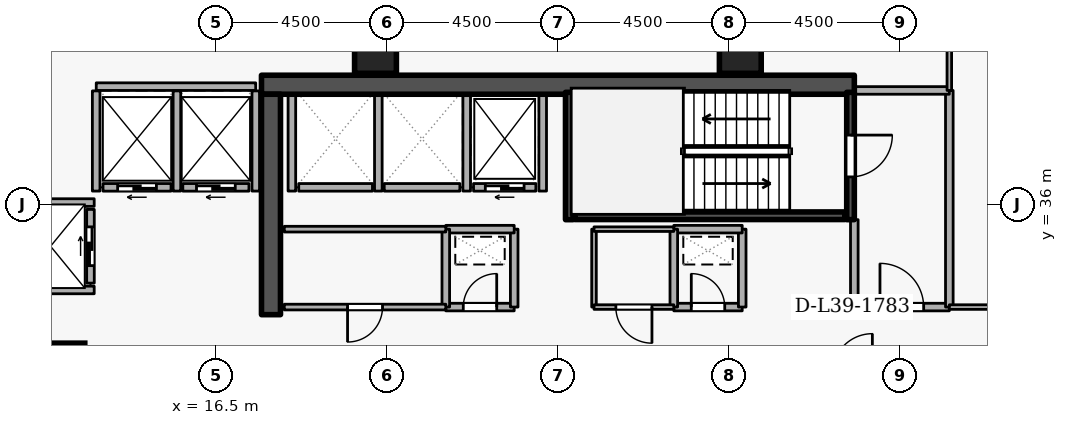
"""IFC4 building model, lengths in metres.
Left out: names, types, materials, properties, quantities, classifications, styles, units other than length and angle.
Written with IfcOpenShell. Run it as: python <this file> out.ifc"""

import sys

from ifc_helpers import new_model, si_unit, direction, frame, frame_2d, origin, origin_2d, place, context, subcontext, project, spatial, rectangle, extrude, element, fill, save


model = new_model("IFC4")
c1 = context("Model", 3, precision=1e-05, world=origin(), true_north=direction((0.0, 1.0)))
c2 = subcontext(c1, "Body", "Model", "MODEL_VIEW")
j1 = project(units=[si_unit("LENGTHUNIT", "METRE"), si_unit("PLANEANGLEUNIT", "RADIAN")], contexts=[c1])
p1 = place(None, origin())
s1 = spatial("IfcSite", under=j1, at=p1, CompositionType="ELEMENT")
p2 = place(p1, origin())
s2 = spatial("IfcBuilding", under=s1, at=p2, CompositionType="ELEMENT")
p3 = place(p2, frame((0.0, 0.0, 149.1)))
s3 = spatial("IfcBuildingStorey", under=s2, at=p3, CompositionType="ELEMENT", Elevation=149.1)
p4 = place(p3, frame((17.7, 39.15, 0.0), z_axis=(0.0, 0.0, 1.0), x_axis=(1.0, 0.0, 0.0)))
e1 = element("IfcWall", 1, at=p4, inside=s3, PredefinedType="SHEAR", context=c2, shape_type="SweptSolid", body=[
    extrude(rectangle(XDim=15.6, YDim=0.5, at=frame_2d((7.8, 0.0))), origin(), (0.0, 0.0, 1.0), 3.6),
])
p5 = place(p3, frame((17.95, 33.1, 0.0), z_axis=(0.0, 0.0, 1.0), x_axis=(0.0, 1.0, 0.0)))
e2 = element("IfcWall", 2, at=p5, inside=s3, PredefinedType="SHEAR", context=c2, shape_type="SweptSolid", body=[
    extrude(rectangle(XDim=5.8, YDim=0.5, at=frame_2d((2.9, 0.0))), origin(), (0.0, 0.0, 1.0), 3.6),
])
for number, where, z_axis, x_axis in (
    (3, (12.5, 31.8, 0.0), (0.0, 0.0, 1.0), (1.0, 0.0, 0.0)),
    (4, (20.7, 40.0, 0.0), (0.0, 0.0, 1.0), (1.0, 0.0, 0.0)),
    (5, (30.3, 40.0, 0.0), (0.0, 0.0, 1.0), (1.0, 0.0, 0.0)),
):
    element("IfcColumn", number, at=place(p3, frame(where, z_axis=z_axis, x_axis=x_axis)), inside=s3, PredefinedType="COLUMN", context=c2, shape_type="SweptSolid", body=[
        extrude(rectangle(XDim=1.1, YDim=1.1, at=origin_2d()), origin(), (0.0, 0.0, 1.0), 3.6),
    ])
p6 = place(p3, frame((24.92, 36.45, 0.0), z_axis=(0.0, 0.0, 1.0), x_axis=(-1.0, 0.0, 0.0)))
e6 = element("IfcWall", 6, at=p6, inside=s3, PredefinedType="STANDARD", context=c2, shape_type="SweptSolid", body=[
    extrude(rectangle(XDim=1.64, YDim=0.2, at=frame_2d((0.82, 0.0))), origin(), (0.0, 0.0, 1.0), 3.3),
])
p7 = place(p6, frame((0.31, 0.0, 0.0)))
e7 = element("IfcOpeningElement", 7, at=p7, cuts=e6, PredefinedType="OPENING", context=c2, shape_type="SweptSolid", body=[
    extrude(rectangle(XDim=1.02, YDim=2.06, at=frame_2d((0.51, 1.03))), frame((0.0, 0.11, 0.0), z_axis=(0.0, -1.0, 0.0), x_axis=(1.0, 0.0, 0.0)), (0.0, 0.0, 1.0), 0.22),
])
p8 = place(p3, frame((22.92, 36.45, 0.0), z_axis=(0.0, 0.0, 1.0), x_axis=(-1.0, 0.0, 0.0)))
e8 = element("IfcWall", 8, at=p8, inside=s3, PredefinedType="STANDARD", context=c2, shape_type="SweptSolid", body=[
    extrude(rectangle(XDim=1.99, YDim=0.2, at=frame_2d((0.995, 0.0))), origin(), (0.0, 0.0, 1.0), 3.3),
])
p9 = place(p3, frame((20.62, 36.45, 0.0), z_axis=(0.0, 0.0, 1.0), x_axis=(-1.0, 0.0, 0.0)))
e9 = element("IfcWall", 9, at=p9, inside=s3, PredefinedType="STANDARD", context=c2, shape_type="SweptSolid", body=[
    extrude(rectangle(XDim=1.94, YDim=0.2, at=frame_2d((0.97, 0.0))), origin(), (0.0, 0.0, 1.0), 3.3),
])
p10 = place(p3, frame((17.37, 36.45, 0.0), z_axis=(0.0, 0.0, 1.0), x_axis=(-1.0, 0.0, 0.0)))
e10 = element("IfcWall", 10, at=p10, inside=s3, PredefinedType="STANDARD", context=c2, shape_type="SweptSolid", body=[
    extrude(rectangle(XDim=1.74, YDim=0.2, at=frame_2d((0.87, 0.0))), origin(), (0.0, 0.0, 1.0), 3.3),
])
p11 = place(p10, frame((0.36, 0.0, 0.0)))
e11 = element("IfcOpeningElement", 11, at=p11, cuts=e10, PredefinedType="OPENING", context=c2, shape_type="SweptSolid", body=[
    extrude(rectangle(XDim=1.02, YDim=2.06, at=frame_2d((0.51, 1.03))), frame((0.0, 0.11, 0.0), z_axis=(0.0, -1.0, 0.0), x_axis=(1.0, 0.0, 0.0)), (0.0, 0.0, 1.0), 0.22),
])
p12 = place(p3, frame((15.32, 36.45, 0.0), z_axis=(0.0, 0.0, 1.0), x_axis=(-1.0, 0.0, 0.0)))
e12 = element("IfcWall", 12, at=p12, inside=s3, PredefinedType="STANDARD", context=c2, shape_type="SweptSolid", body=[
    extrude(rectangle(XDim=1.79, YDim=0.2, at=frame_2d((0.895, 0.0))), origin(), (0.0, 0.0, 1.0), 3.3),
])
p13 = place(p12, frame((0.385, 0.0, 0.0)))
e13 = element("IfcOpeningElement", 13, at=p13, cuts=e12, PredefinedType="OPENING", context=c2, shape_type="SweptSolid", body=[
    extrude(rectangle(XDim=1.02, YDim=2.06, at=frame_2d((0.51, 1.03))), frame((0.0, 0.11, 0.0), z_axis=(0.0, -1.0, 0.0), x_axis=(1.0, 0.0, 0.0)), (0.0, 0.0, 1.0), 0.22),
])
p14 = place(p3, frame((13.2, 33.93, 0.0), z_axis=(0.0, 0.0, 1.0), x_axis=(0.0, 1.0, 0.0)))
e14 = element("IfcWall", 14, at=p14, inside=s3, PredefinedType="STANDARD", context=c2, shape_type="SweptSolid", body=[
    extrude(rectangle(XDim=1.94, YDim=0.2, at=frame_2d((0.97, 0.0))), origin(), (0.0, 0.0, 1.0), 3.3),
])
p15 = place(p14, frame((0.46, 0.0, 0.0)))
e15 = element("IfcOpeningElement", 15, at=p15, cuts=e14, PredefinedType="OPENING", context=c2, shape_type="SweptSolid", body=[
    extrude(rectangle(XDim=1.02, YDim=2.06, at=frame_2d((0.51, 1.03))), frame((0.0, 0.11, 0.0), z_axis=(0.0, -1.0, 0.0), x_axis=(1.0, 0.0, 0.0)), (0.0, 0.0, 1.0), 0.22),
])
for number, where, z_axis, x_axis in (
    (16, (25.1, 36.352, 0.0), (0.0, 0.0, 1.0), (0.0, 1.0, 0.0)),
    (17, (23.1, 36.352, 0.0), (0.0, 0.0, 1.0), (0.0, 1.0, 0.0)),
    (18, (20.775, 36.352, 0.0), (0.0, 0.0, 1.0), (0.0, 1.0, 0.0)),
    (19, (18.5, 36.352, 0.0), (0.0, 0.0, 1.0), (0.0, 1.0, 0.0)),
):
    element("IfcWall", number, at=place(p3, frame(where, z_axis=z_axis, x_axis=x_axis)), inside=s3, PredefinedType="STANDARD", context=c2, shape_type="SweptSolid", body=[
        extrude(rectangle(XDim=2.536, YDim=0.2, at=frame_2d((1.268, 0.0))), origin(), (0.0, 0.0, 1.0), 3.3),
    ])
p16 = place(p3, frame((13.352, 39.1, 0.0), z_axis=(0.0, 0.0, 1.0), x_axis=(1.0, 0.0, 0.0)))
e20 = element("IfcWall", 20, at=p16, inside=s3, PredefinedType="STANDARD", context=c2, shape_type="SweptSolid", body=[
    extrude(rectangle(XDim=4.196, YDim=0.2, at=frame_2d((2.098, 0.0))), origin(), (0.0, 0.0, 1.0), 3.3),
])
p17 = place(p3, frame((17.55, 36.352, 0.0), z_axis=(0.0, 0.0, 1.0), x_axis=(0.0, 1.0, 0.0)))
e21 = element("IfcWall", 21, at=p17, inside=s3, PredefinedType="STANDARD", context=c2, shape_type="SweptSolid", body=[
    extrude(rectangle(XDim=2.636, YDim=0.2, at=frame_2d((1.318, 0.0))), origin(), (0.0, 0.0, 1.0), 2.505),
])
for number, where, z_axis, x_axis in (
    (22, (15.475, 36.352, 0.0), (0.0, 0.0, 1.0), (0.0, 1.0, 0.0)),
    (23, (13.35, 36.352, 0.0), (0.0, 0.0, 1.0), (0.0, 1.0, 0.0)),
):
    element("IfcWall", number, at=place(p3, frame(where, z_axis=z_axis, x_axis=x_axis)), inside=s3, PredefinedType="STANDARD", context=c2, shape_type="SweptSolid", body=[
        extrude(rectangle(XDim=2.636, YDim=0.2, at=frame_2d((1.318, 0.0))), origin(), (0.0, 0.0, 1.0), 3.3),
    ])
for number, where, z_axis, x_axis in (
    (24, (11.002, 36.05, 0.0), (0.0, 0.0, 1.0), (1.0, 0.0, 0.0)),
    (25, (11.002, 33.75, 0.0), (0.0, 0.0, 1.0), (1.0, 0.0, 0.0)),
):
    element("IfcWall", number, at=place(p3, frame(where, z_axis=z_axis, x_axis=x_axis)), inside=s3, PredefinedType="STANDARD", context=c2, shape_type="SweptSolid", body=[
        extrude(rectangle(XDim=2.296, YDim=0.2, at=frame_2d((1.148, 0.0))), origin(), (0.0, 0.0, 1.0), 3.3),
    ])
p18 = place(p3, frame((33.2, 38.95, 0.0), z_axis=(0.0, 0.0, 1.0), x_axis=(0.0, -1.0, 0.0)))
e26 = element("IfcWall", 26, at=p18, inside=s3, PredefinedType="SHEAR", context=c2, shape_type="SweptSolid", body=[
    extrude(rectangle(XDim=3.35, YDim=0.2, at=frame_2d((1.675, 0.0))), origin(), (0.0, 0.0, 1.0), 3.6),
])
p19 = place(p18, frame((1.125, 0.0, 0.0)))
e27 = element("IfcOpeningElement", 27, at=p19, cuts=e26, PredefinedType="OPENING", context=c2, shape_type="SweptSolid", body=[
    extrude(rectangle(XDim=1.1, YDim=2.1, at=frame_2d((0.55, 1.05))), frame((0.0, 0.11, 0.0), z_axis=(0.0, -1.0, 0.0), x_axis=(1.0, 0.0, 0.0)), (0.0, 0.0, 1.0), 0.22),
])
p20 = place(p3, frame((25.8, 35.6, 0.0), z_axis=(0.0, 0.0, 1.0), x_axis=(0.0, 1.0, 0.0)))
e28 = element("IfcWall", 28, at=p20, inside=s3, PredefinedType="SHEAR", context=c2, shape_type="SweptSolid", body=[
    extrude(rectangle(XDim=3.35, YDim=0.2, at=frame_2d((1.675, 0.0))), origin(), (0.0, 0.0, 1.0), 3.6),
])
p21 = place(p3, frame((25.95, 35.703, 0.0), z_axis=(0.0, 0.0, 1.0), x_axis=(1.0, 0.0, 0.0)))
e29 = element("IfcWall", 29, at=p21, inside=s3, PredefinedType="SHEAR", context=c2, shape_type="SweptSolid", body=[
    extrude(rectangle(XDim=7.1, YDim=0.2, at=frame_2d((3.55, 0.0))), origin(), (0.0, 0.0, 1.0), 3.6),
])
p22 = place(p3, frame((33.3, 33.3, 0.0), z_axis=(0.0, 0.0, 1.0), x_axis=(1.0, 0.0, 0.0)))
e30 = element("IfcWall", 30, at=p22, inside=s3, PredefinedType="STANDARD", context=c2, shape_type="SweptSolid", body=[
    extrude(rectangle(XDim=2.5, YDim=0.2, at=frame_2d((1.25, 0.0))), origin(), (0.0, 0.0, 1.0), 3.3),
])
p23 = place(p22, frame((0.675, 0.0, 0.0)))
e31 = element("IfcOpeningElement", 31, at=p23, cuts=e30, PredefinedType="OPENING", context=c2, shape_type="SweptSolid", body=[
    extrude(rectangle(XDim=1.15, YDim=2.1, at=frame_2d((0.575, 1.05))), frame((0.0, 0.11, 0.0), z_axis=(0.0, -1.0, 0.0), x_axis=(1.0, 0.0, 0.0)), (0.0, 0.0, 1.0), 0.22),
])
p24 = place(p3, frame((35.8, 33.3, 0.0), z_axis=(0.0, 0.0, 1.0), x_axis=(0.0, 1.0, 0.0)))
e32 = element("IfcWall", 32, at=p24, inside=s3, PredefinedType="STANDARD", context=c2, shape_type="SweptSolid", body=[
    extrude(rectangle(XDim=5.7, YDim=0.2, at=frame_2d((2.85, 0.0))), origin(), (0.0, 0.0, 1.0), 3.3),
])
p25 = place(p3, frame((35.8, 39.0, 0.0), z_axis=(0.0, 0.0, 1.0), x_axis=(-1.0, 0.0, 0.0)))
e33 = element("IfcWall", 33, at=p25, inside=s3, PredefinedType="STANDARD", context=c2, shape_type="SweptSolid", body=[
    extrude(rectangle(XDim=2.5, YDim=0.2, at=frame_2d((1.25, 0.0))), origin(), (0.0, 0.0, 1.0), 3.3),
])
p26 = place(p3, frame((33.3, 35.6, 0.0), z_axis=(0.0, 0.0, 1.0), x_axis=(0.0, -1.0, 0.0)))
e34 = element("IfcWall", 34, at=p26, inside=s3, PredefinedType="STANDARD", context=c2, shape_type="SweptSolid", body=[
    extrude(rectangle(XDim=2.3, YDim=0.2, at=frame_2d((1.15, 0.0))), origin(), (0.0, 0.0, 1.0), 2.505),
])
p27 = place(p3, frame((22.55, 33.3, 0.0), z_axis=(0.0, 0.0, 1.0), x_axis=(1.0, 0.0, 0.0)))
e35 = element("IfcWall", 35, at=p27, inside=s3, PredefinedType="STANDARD", context=c2, shape_type="SweptSolid", body=[
    extrude(rectangle(XDim=1.8, YDim=0.2, at=frame_2d((0.9, 0.0))), origin(), (0.0, 0.0, 1.0), 3.3),
])
p28 = place(p27, frame((0.46, 0.0, 0.0)))
e36 = element("IfcOpeningElement", 36, at=p28, cuts=e35, PredefinedType="OPENING", context=c2, shape_type="SweptSolid", body=[
    extrude(rectangle(XDim=0.88, YDim=2.04, at=frame_2d((0.44, 1.02))), frame((0.0, 0.11, 0.0), z_axis=(0.0, -1.0, 0.0), x_axis=(1.0, 0.0, 0.0)), (0.0, 0.0, 1.0), 0.22),
])
p29 = place(p3, frame((24.35, 33.3, 0.0), z_axis=(0.0, 0.0, 1.0), x_axis=(0.0, 1.0, 0.0)))
e37 = element("IfcWall", 37, at=p29, inside=s3, PredefinedType="STANDARD", context=c2, shape_type="SweptSolid", body=[
    extrude(rectangle(XDim=2.05, YDim=0.2, at=frame_2d((1.025, 0.0))), origin(), (0.0, 0.0, 1.0), 3.3),
])
p30 = place(p3, frame((24.35, 35.35, 0.0), z_axis=(0.0, 0.0, 1.0), x_axis=(-1.0, 0.0, 0.0)))
e38 = element("IfcWall", 38, at=p30, inside=s3, PredefinedType="STANDARD", context=c2, shape_type="SweptSolid", body=[
    extrude(rectangle(XDim=1.8, YDim=0.2, at=frame_2d((0.9, 0.0))), origin(), (0.0, 0.0, 1.0), 3.3),
])
p31 = place(p3, frame((22.55, 35.35, 0.0), z_axis=(0.0, 0.0, 1.0), x_axis=(0.0, -1.0, 0.0)))
e39 = element("IfcWall", 39, at=p31, inside=s3, PredefinedType="STANDARD", context=c2, shape_type="SweptSolid", body=[
    extrude(rectangle(XDim=2.05, YDim=0.2, at=frame_2d((1.025, 0.0))), origin(), (0.0, 0.0, 1.0), 3.3),
])
p32 = place(p3, frame((28.55, 33.3, 0.0), z_axis=(0.0, 0.0, 1.0), x_axis=(1.0, 0.0, 0.0)))
e40 = element("IfcWall", 40, at=p32, inside=s3, PredefinedType="STANDARD", context=c2, shape_type="SweptSolid", body=[
    extrude(rectangle(XDim=1.8, YDim=0.2, at=frame_2d((0.9, 0.0))), origin(), (0.0, 0.0, 1.0), 3.3),
])
p33 = place(p32, frame((0.46, 0.0, 0.0)))
e41 = element("IfcOpeningElement", 41, at=p33, cuts=e40, PredefinedType="OPENING", context=c2, shape_type="SweptSolid", body=[
    extrude(rectangle(XDim=0.88, YDim=2.04, at=frame_2d((0.44, 1.02))), frame((0.0, 0.11, 0.0), z_axis=(0.0, -1.0, 0.0), x_axis=(1.0, 0.0, 0.0)), (0.0, 0.0, 1.0), 0.22),
])
p34 = place(p3, frame((30.35, 33.3, 0.0), z_axis=(0.0, 0.0, 1.0), x_axis=(0.0, 1.0, 0.0)))
e42 = element("IfcWall", 42, at=p34, inside=s3, PredefinedType="STANDARD", context=c2, shape_type="SweptSolid", body=[
    extrude(rectangle(XDim=2.05, YDim=0.2, at=frame_2d((1.025, 0.0))), origin(), (0.0, 0.0, 1.0), 3.3),
])
p35 = place(p3, frame((30.35, 35.35, 0.0), z_axis=(0.0, 0.0, 1.0), x_axis=(-1.0, 0.0, 0.0)))
e43 = element("IfcWall", 43, at=p35, inside=s3, PredefinedType="STANDARD", context=c2, shape_type="SweptSolid", body=[
    extrude(rectangle(XDim=1.8, YDim=0.2, at=frame_2d((0.9, 0.0))), origin(), (0.0, 0.0, 1.0), 3.3),
])
p36 = place(p3, frame((28.55, 35.35, 0.0), z_axis=(0.0, 0.0, 1.0), x_axis=(0.0, -1.0, 0.0)))
e44 = element("IfcWall", 44, at=p36, inside=s3, PredefinedType="STANDARD", context=c2, shape_type="SweptSolid", body=[
    extrude(rectangle(XDim=2.05, YDim=0.2, at=frame_2d((1.025, 0.0))), origin(), (0.0, 0.0, 1.0), 3.3),
])
p37 = place(p3, frame((18.3, 35.35, 0.0), z_axis=(0.0, 0.0, 1.0), x_axis=(1.0, 0.0, 0.0)))
e45 = element("IfcWall", 45, at=p37, inside=s3, PredefinedType="PARTITIONING", context=c2, shape_type="SweptSolid", body=[
    extrude(rectangle(XDim=4.25, YDim=0.15, at=frame_2d((2.125, 0.0))), origin(), (0.0, 0.0, 1.0), 3.3),
])
p38 = place(p3, frame((22.55, 33.3, 0.0), z_axis=(0.0, 0.0, 1.0), x_axis=(-1.0, 0.0, 0.0)))
e46 = element("IfcWall", 46, at=p38, inside=s3, PredefinedType="PARTITIONING", context=c2, shape_type="SweptSolid", body=[
    extrude(rectangle(XDim=4.25, YDim=0.15, at=frame_2d((2.125, 0.0))), origin(), (0.0, 0.0, 1.0), 3.3),
])
p39 = place(p38, frame((1.665, 0.0, 0.0)))
e47 = element("IfcOpeningElement", 47, at=p39, cuts=e46, PredefinedType="OPENING", context=c2, shape_type="SweptSolid", body=[
    extrude(rectangle(XDim=0.92, YDim=2.08, at=frame_2d((0.46, 1.04))), frame((0.0, 0.085, 0.0), z_axis=(0.0, -1.0, 0.0), x_axis=(1.0, 0.0, 0.0)), (0.0, 0.0, 1.0), 0.17),
])
p40 = place(p3, frame((26.45, 33.3, 0.0), z_axis=(0.0, 0.0, 1.0), x_axis=(0.0, 1.0, 0.0)))
e48 = element("IfcWall", 48, at=p40, inside=s3, PredefinedType="PARTITIONING", context=c2, shape_type="SweptSolid", body=[
    extrude(rectangle(XDim=2.05, YDim=0.12, at=frame_2d((1.025, 0.0))), origin(), (0.0, 0.0, 1.0), 3.3),
])
p41 = place(p3, frame((26.45, 35.35, 0.0), z_axis=(0.0, 0.0, 1.0), x_axis=(1.0, 0.0, 0.0)))
e49 = element("IfcWall", 49, at=p41, inside=s3, PredefinedType="PARTITIONING", context=c2, shape_type="SweptSolid", body=[
    extrude(rectangle(XDim=2.1, YDim=0.12, at=frame_2d((1.05, 0.0))), origin(), (0.0, 0.0, 1.0), 3.3),
])
p42 = place(p3, frame((28.55, 33.3, 0.0), z_axis=(0.0, 0.0, 1.0), x_axis=(-1.0, 0.0, 0.0)))
e50 = element("IfcWall", 50, at=p42, inside=s3, PredefinedType="PARTITIONING", context=c2, shape_type="SweptSolid", body=[
    extrude(rectangle(XDim=2.1, YDim=0.12, at=frame_2d((1.05, 0.0))), origin(), (0.0, 0.0, 1.0), 3.3),
])
p43 = place(p42, frame((0.575, 0.0, 0.0)))
e51 = element("IfcOpeningElement", 51, at=p43, cuts=e50, PredefinedType="OPENING", context=c2, shape_type="SweptSolid", body=[
    extrude(rectangle(XDim=0.95, YDim=2.1, at=frame_2d((0.475, 1.05))), frame((0.0, 0.07, 0.0), z_axis=(0.0, -1.0, 0.0), x_axis=(1.0, 0.0, 0.0)), (0.0, 0.0, 1.0), 0.14),
])
p44 = place(p3, frame((37.75, 33.3, 0.0), z_axis=(0.0, 0.0, 1.0), x_axis=(-1.0, 0.0, 0.0)))
e52 = element("IfcWall", 52, at=p44, inside=s3, PredefinedType="PARTITIONING", context=c2, shape_type="SweptSolid", body=[
    extrude(rectangle(XDim=1.95, YDim=0.12, at=frame_2d((0.975, 0.0))), origin(), (0.0, 0.0, 1.0), 3.3),
])
p45 = place(p3, frame((35.8, 39.0, 0.0), z_axis=(0.0, 0.0, 1.0), x_axis=(0.0, 1.0, 0.0)))
e53 = element("IfcWall", 53, at=p45, inside=s3, PredefinedType="PARTITIONING", context=c2, shape_type="SweptSolid", body=[
    extrude(rectangle(XDim=5.72, YDim=0.12, at=frame_2d((2.86, 0.0))), origin(), (0.0, 0.0, 1.0), 3.3),
])
p46 = place(p7, origin())
e54 = element("IfcDoor", 54, at=p46, inside=s3, OperationType="SLIDING_TO_LEFT", PredefinedType="DOOR", context=c2, shape_type="SweptSolid", body=[
    extrude(rectangle(XDim=1.02, YDim=2.06, at=frame_2d((0.51, 1.03))), frame((0.0, 0.025, 0.0), z_axis=(0.0, -1.0, 0.0), x_axis=(1.0, 0.0, 0.0)), (0.0, 0.0, 1.0), 0.05),
])
fill(e7, e54)
p47 = place(p11, origin())
e55 = element("IfcDoor", 55, at=p47, inside=s3, OperationType="SLIDING_TO_LEFT", PredefinedType="DOOR", context=c2, shape_type="SweptSolid", body=[
    extrude(rectangle(XDim=1.02, YDim=2.06, at=frame_2d((0.51, 1.03))), frame((0.0, 0.025, 0.0), z_axis=(0.0, -1.0, 0.0), x_axis=(1.0, 0.0, 0.0)), (0.0, 0.0, 1.0), 0.05),
])
fill(e11, e55)
p48 = place(p13, origin())
e56 = element("IfcDoor", 56, at=p48, inside=s3, OperationType="SLIDING_TO_LEFT", PredefinedType="DOOR", context=c2, shape_type="SweptSolid", body=[
    extrude(rectangle(XDim=1.02, YDim=2.06, at=frame_2d((0.51, 1.03))), frame((0.0, 0.025, 0.0), z_axis=(0.0, -1.0, 0.0), x_axis=(1.0, 0.0, 0.0)), (0.0, 0.0, 1.0), 0.05),
])
fill(e13, e56)
p49 = place(p15, origin())
e57 = element("IfcDoor", 57, at=p49, inside=s3, OperationType="SLIDING_TO_LEFT", PredefinedType="DOOR", context=c2, shape_type="SweptSolid", body=[
    extrude(rectangle(XDim=1.02, YDim=2.06, at=frame_2d((0.51, 1.03))), frame((0.0, 0.025, 0.0), z_axis=(0.0, -1.0, 0.0), x_axis=(1.0, 0.0, 0.0)), (0.0, 0.0, 1.0), 0.05),
])
fill(e15, e57)
p50 = place(p19, origin())
e58 = element("IfcDoor", 58, at=p50, inside=s3, OperationType="SINGLE_SWING_LEFT", PredefinedType="DOOR", context=c2, shape_type="SweptSolid", body=[
    extrude(rectangle(XDim=1.1, YDim=2.1, at=frame_2d((0.55, 1.05))), frame((0.0, 0.025, 0.0), z_axis=(0.0, -1.0, 0.0), x_axis=(1.0, 0.0, 0.0)), (0.0, 0.0, 1.0), 0.05),
])
fill(e27, e58)
p51 = place(p23, origin())
e59 = element("IfcDoor", 59, at=p51, inside=s3, OperationType="SINGLE_SWING_LEFT", PredefinedType="DOOR", context=c2, shape_type="SweptSolid", body=[
    extrude(rectangle(XDim=1.15, YDim=2.1, at=frame_2d((0.575, 1.05))), frame((0.0, 0.025, 0.0), z_axis=(0.0, -1.0, 0.0), x_axis=(1.0, 0.0, 0.0)), (0.0, 0.0, 1.0), 0.05),
])
fill(e31, e59)
p52 = place(p28, origin())
e60 = element("IfcDoor", 60, at=p52, inside=s3, OperationType="SINGLE_SWING_RIGHT", PredefinedType="DOOR", context=c2, shape_type="SweptSolid", body=[
    extrude(rectangle(XDim=0.88, YDim=2.04, at=frame_2d((0.44, 1.02))), frame((0.0, 0.025, 0.0), z_axis=(0.0, -1.0, 0.0), x_axis=(1.0, 0.0, 0.0)), (0.0, 0.0, 1.0), 0.05),
])
fill(e36, e60)
p53 = place(p33, origin())
e61 = element("IfcDoor", 61, at=p53, inside=s3, OperationType="SINGLE_SWING_LEFT", PredefinedType="DOOR", context=c2, shape_type="SweptSolid", body=[
    extrude(rectangle(XDim=0.88, YDim=2.04, at=frame_2d((0.44, 1.02))), frame((0.0, 0.025, 0.0), z_axis=(0.0, -1.0, 0.0), x_axis=(1.0, 0.0, 0.0)), (0.0, 0.0, 1.0), 0.05),
])
fill(e41, e61)
p54 = place(p39, origin())
e62 = element("IfcDoor", 62, at=p54, inside=s3, OperationType="SINGLE_SWING_RIGHT", PredefinedType="DOOR", context=c2, shape_type="SweptSolid", body=[
    extrude(rectangle(XDim=0.92, YDim=2.08, at=frame_2d((0.46, 1.04))), frame((0.0, 0.025, 0.0), z_axis=(0.0, -1.0, 0.0), x_axis=(1.0, 0.0, 0.0)), (0.0, 0.0, 1.0), 0.05),
])
fill(e47, e62)
p55 = place(p43, origin())
e63 = element("IfcDoor", 63, at=p55, inside=s3, OperationType="SINGLE_SWING_LEFT", PredefinedType="DOOR", context=c2, shape_type="SweptSolid", body=[
    extrude(rectangle(XDim=0.95, YDim=2.1, at=frame_2d((0.475, 1.05))), frame((0.0, 0.025, 0.0), z_axis=(0.0, -1.0, 0.0), x_axis=(1.0, 0.0, 0.0)), (0.0, 0.0, 1.0), 0.05),
])
fill(e51, e63)
save(model, sys.argv[1])
